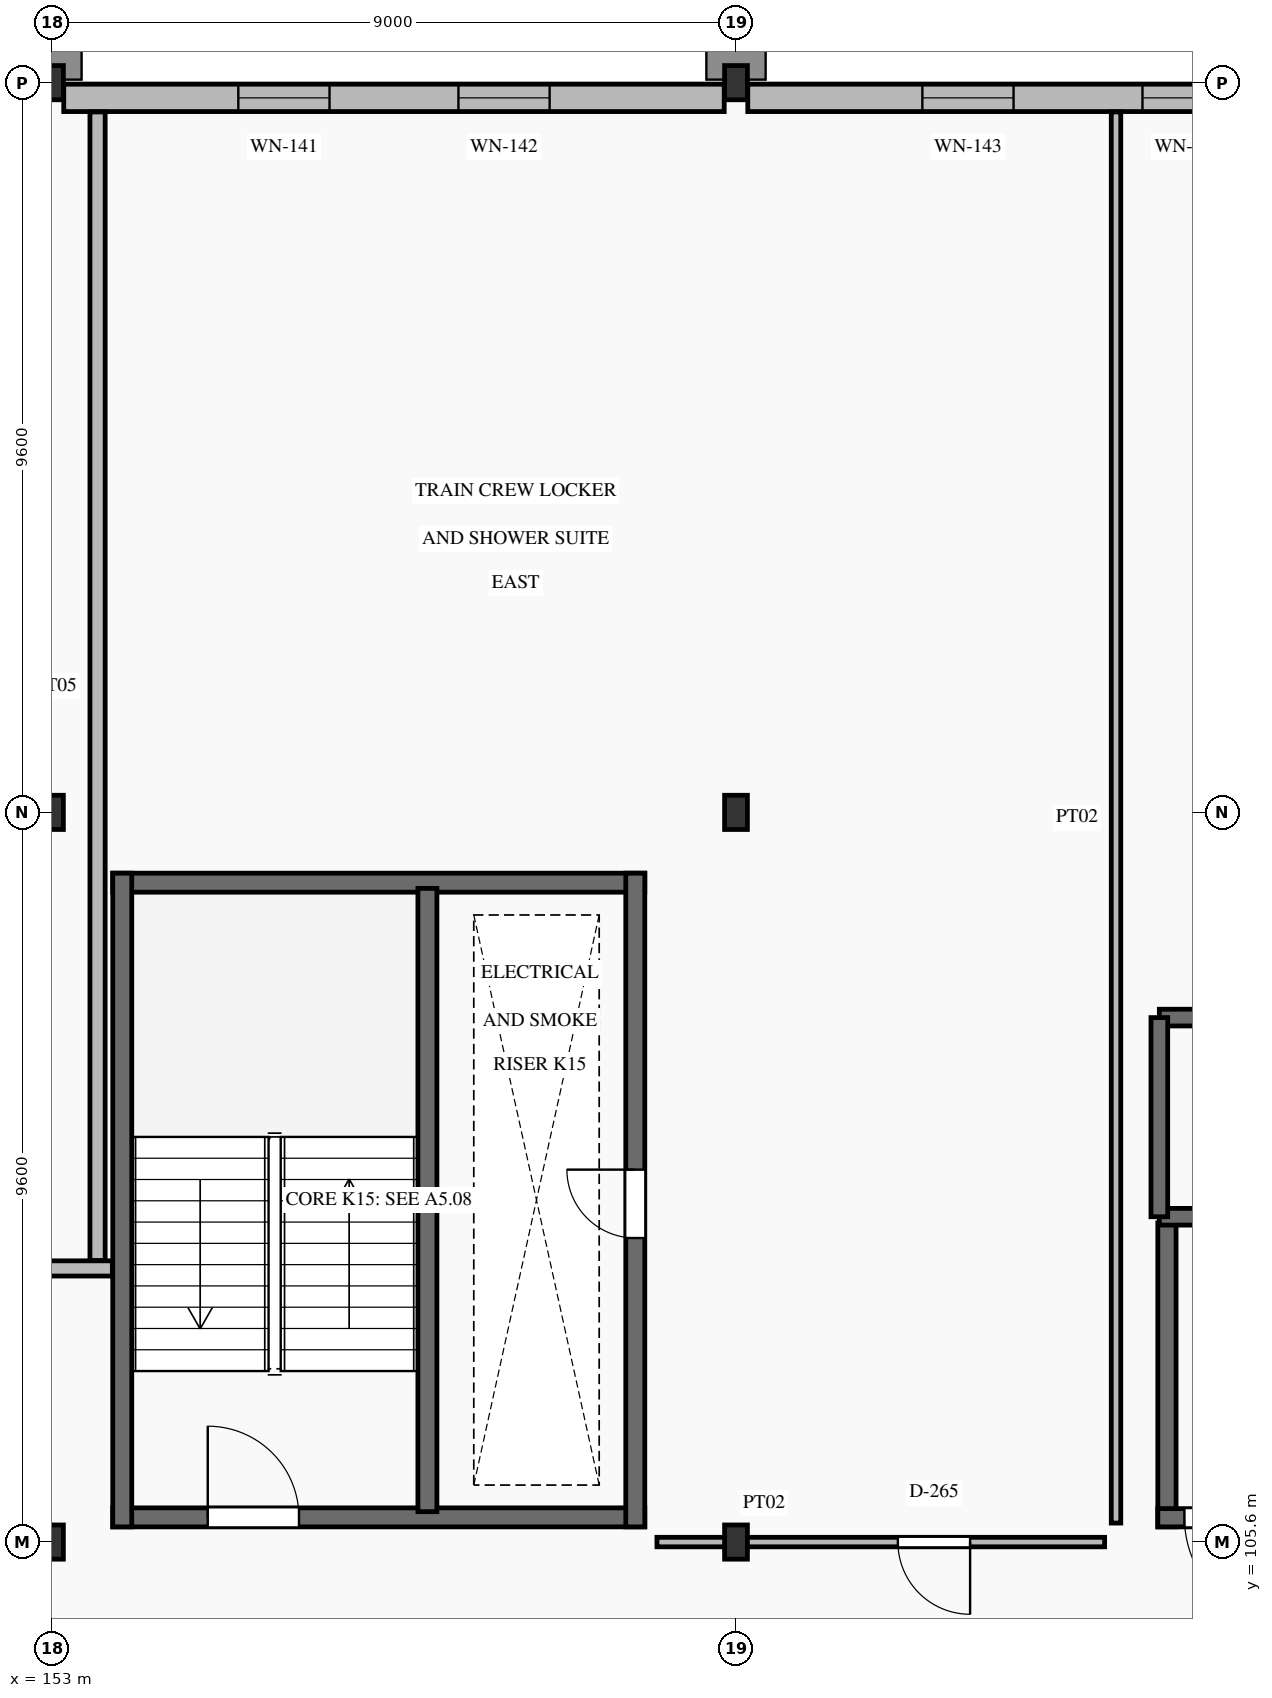
"""IFC4 building model, lengths in metres.
Left out: names, types, materials, properties, quantities, classifications, styles, units other than length and angle.
Written with IfcOpenShell. Run it as: python <this file> out.ifc"""

import sys

from ifc_helpers import new_model, si_unit, direction, frame, frame_2d, origin, origin_2d, place, context, subcontext, project, spatial, rectangle, i_section, extrude, element, fill, save


model = new_model("IFC4")
c1 = context("Model", 3, precision=1e-05, world=origin(), true_north=direction((0.0, 1.0)))
c2 = subcontext(c1, "Body", "Model", "MODEL_VIEW")
j1 = project(units=[si_unit("LENGTHUNIT", "METRE"), si_unit("PLANEANGLEUNIT", "RADIAN")], contexts=[c1])
p1 = place(None, origin())
s1 = spatial("IfcSite", under=j1, at=p1, CompositionType="ELEMENT")
p2 = place(p1, origin())
s2 = spatial("IfcBuilding", under=s1, at=p2, CompositionType="ELEMENT")
p3 = place(p2, frame((0.0, 0.0, 10.8)))
s3 = spatial("IfcBuildingStorey", under=s2, at=p3, CompositionType="ELEMENT", Elevation=10.8)
for number, where, z_axis, x_axis in (
    (1, (153.0, 105.6, 0.0), (0.0, 0.0, 1.0), (1.0, 0.0, 0.0)),
    (2, (153.0, 115.2, 0.0), (0.0, 0.0, 1.0), (1.0, 0.0, 0.0)),
    (3, (153.0, 124.8, 0.0), (0.0, 0.0, 1.0), (1.0, 0.0, 0.0)),
    (4, (162.0, 105.6, 0.0), (0.0, 0.0, 1.0), (1.0, 0.0, 0.0)),
    (5, (162.0, 115.2, 0.0), (0.0, 0.0, 1.0), (1.0, 0.0, 0.0)),
    (6, (162.0, 124.8, 0.0), (0.0, 0.0, 1.0), (1.0, 0.0, 0.0)),
):
    element("IfcColumn", number, at=place(p3, frame(where, z_axis=z_axis, x_axis=x_axis)), inside=s3, PredefinedType="COLUMN", context=c2, shape_type="SweptSolid", body=[
        extrude(i_section(OverallWidth=0.3, OverallDepth=0.45, WebThickness=0.014, FlangeThickness=0.026, FilletRadius=0.027, at=origin_2d()), origin(), (0.0, 0.0, 1.0), 4.2),
    ])
p4 = place(p3, frame((153.155, 124.6, 0.0), z_axis=(0.0, 0.0, 1.0), x_axis=(1.0, 0.0, 0.0)))
e7 = element("IfcWall", 7, at=p4, inside=s3, PredefinedType="SOLIDWALL", context=c2, shape_type="SweptSolid", body=[
    extrude(rectangle(XDim=8.69, YDim=0.36, at=frame_2d((4.345, 0.0))), origin(), (0.0, 0.0, 1.0), 3.69),
])
p5 = place(p4, frame((2.297, 0.0, 0.95)))
e8 = element("IfcOpeningElement", 8, at=p5, cuts=e7, PredefinedType="OPENING", context=c2, shape_type="SweptSolid", body=[
    extrude(rectangle(XDim=1.2, YDim=1.8, at=frame_2d((0.6, 0.9))), frame((0.0, 0.195, 0.0), z_axis=(0.0, -1.0, 0.0), x_axis=(1.0, 0.0, 0.0)), (0.0, 0.0, 1.0), 0.39),
])
p6 = place(p4, frame((5.193, 0.0, 0.95)))
e9 = element("IfcOpeningElement", 9, at=p6, cuts=e7, PredefinedType="OPENING", context=c2, shape_type="SweptSolid", body=[
    extrude(rectangle(XDim=1.2, YDim=1.8, at=frame_2d((0.6, 0.9))), frame((0.0, 0.195, 0.0), z_axis=(0.0, -1.0, 0.0), x_axis=(1.0, 0.0, 0.0)), (0.0, 0.0, 1.0), 0.39),
])
p7 = place(p3, frame((162.155, 124.6, 0.0), z_axis=(0.0, 0.0, 1.0), x_axis=(1.0, 0.0, 0.0)))
e10 = element("IfcWall", 10, at=p7, inside=s3, PredefinedType="SOLIDWALL", context=c2, shape_type="SweptSolid", body=[
    extrude(rectangle(XDim=8.69, YDim=0.36, at=frame_2d((4.345, 0.0))), origin(), (0.0, 0.0, 1.0), 3.69),
])
p8 = place(p7, frame((2.297, 0.0, 0.95)))
e11 = element("IfcOpeningElement", 11, at=p8, cuts=e10, PredefinedType="OPENING", context=c2, shape_type="SweptSolid", body=[
    extrude(rectangle(XDim=1.2, YDim=1.8, at=frame_2d((0.6, 0.9))), frame((0.0, 0.195, 0.0), z_axis=(0.0, -1.0, 0.0), x_axis=(1.0, 0.0, 0.0)), (0.0, 0.0, 1.0), 0.39),
])
p9 = place(p7, frame((5.193, 0.0, 0.95)))
e12 = element("IfcOpeningElement", 12, at=p9, cuts=e10, PredefinedType="OPENING", context=c2, shape_type="SweptSolid", body=[
    extrude(rectangle(XDim=1.2, YDim=1.8, at=frame_2d((0.6, 0.9))), frame((0.0, 0.195, 0.0), z_axis=(0.0, -1.0, 0.0), x_axis=(1.0, 0.0, 0.0)), (0.0, 0.0, 1.0), 0.39),
])
p10 = place(p3, frame((167.67, 105.8, 0.0), z_axis=(0.0, 0.0, 1.0), x_axis=(0.0, 1.0, 0.0)))
e13 = element("IfcWall", 13, at=p10, inside=s3, PredefinedType="SHEAR", context=c2, shape_type="SweptSolid", body=[
    extrude(rectangle(XDim=4.0, YDim=0.24, at=frame_2d((2.0, 0.0))), origin(), (0.0, 0.0, 1.0), 4.2),
])
p11 = place(p3, frame((167.55, 105.92, 0.0), z_axis=(0.0, 0.0, 1.0), x_axis=(1.0, 0.0, 0.0)))
e14 = element("IfcWall", 14, at=p11, inside=s3, PredefinedType="SHEAR", context=c2, shape_type="SweptSolid", body=[
    extrude(rectangle(XDim=4.2, YDim=0.24, at=frame_2d((2.1, 0.0))), origin(), (0.0, 0.0, 1.0), 4.2),
])
p12 = place(p11, frame((0.35, 0.0, 0.0)))
e15 = element("IfcOpeningElement", 15, at=p12, cuts=e14, PredefinedType="OPENING", context=c2, shape_type="SweptSolid", body=[
    extrude(rectangle(XDim=1.4, YDim=2.2, at=frame_2d((0.7, 1.1))), frame((0.0, 0.135, 0.0), z_axis=(0.0, -1.0, 0.0), x_axis=(1.0, 0.0, 0.0)), (0.0, 0.0, 1.0), 0.27),
])
p13 = place(p3, frame((153.8, 105.925, 0.0), z_axis=(0.0, 0.0, 1.0), x_axis=(1.0, 0.0, 0.0)))
e16 = element("IfcWall", 16, at=p13, inside=s3, PredefinedType="SHEAR", context=c2, shape_type="SweptSolid", body=[
    extrude(rectangle(XDim=7.0, YDim=0.25, at=frame_2d((3.5, 0.0))), origin(), (0.0, 0.0, 1.0), 4.2),
])
p14 = place(p13, frame((1.25, 0.0, 0.0)))
e17 = element("IfcOpeningElement", 17, at=p14, cuts=e16, PredefinedType="OPENING", context=c2, shape_type="SweptSolid", body=[
    extrude(rectangle(XDim=1.2, YDim=2.15, at=frame_2d((0.6, 1.075))), frame((0.0, 0.14, 0.0), z_axis=(0.0, -1.0, 0.0), x_axis=(1.0, 0.0, 0.0)), (0.0, 0.0, 1.0), 0.28),
])
p15 = place(p3, frame((153.8, 114.275, 0.0), z_axis=(0.0, 0.0, 1.0), x_axis=(1.0, 0.0, 0.0)))
e18 = element("IfcWall", 18, at=p15, inside=s3, PredefinedType="SHEAR", context=c2, shape_type="SweptSolid", body=[
    extrude(rectangle(XDim=7.0, YDim=0.25, at=frame_2d((3.5, 0.0))), origin(), (0.0, 0.0, 1.0), 4.2),
])
p16 = place(p3, frame((153.925, 105.8, 0.0), z_axis=(0.0, 0.0, 1.0), x_axis=(0.0, 1.0, 0.0)))
e19 = element("IfcWall", 19, at=p16, inside=s3, PredefinedType="SHEAR", context=c2, shape_type="SweptSolid", body=[
    extrude(rectangle(XDim=8.6, YDim=0.25, at=frame_2d((4.3, 0.0))), origin(), (0.0, 0.0, 1.0), 4.2),
])
p17 = place(p3, frame((160.675, 105.8, 0.0), z_axis=(0.0, 0.0, 1.0), x_axis=(0.0, 1.0, 0.0)))
e20 = element("IfcWall", 20, at=p17, inside=s3, PredefinedType="SHEAR", context=c2, shape_type="SweptSolid", body=[
    extrude(rectangle(XDim=8.6, YDim=0.25, at=frame_2d((4.3, 0.0))), origin(), (0.0, 0.0, 1.0), 4.2),
])
p18 = place(p17, frame((3.8, 0.0, 0.0)))
e21 = element("IfcOpeningElement", 21, at=p18, cuts=e20, PredefinedType="OPENING", context=c2, shape_type="SweptSolid", body=[
    extrude(rectangle(XDim=0.9, YDim=2.05, at=frame_2d((0.45, 1.025))), frame((0.0, 0.14, 0.0), z_axis=(0.0, -1.0, 0.0), x_axis=(1.0, 0.0, 0.0)), (0.0, 0.0, 1.0), 0.28),
])
p19 = place(p3, frame((157.94, 106.0, 0.0), z_axis=(0.0, 0.0, 1.0), x_axis=(0.0, 1.0, 0.0)))
e22 = element("IfcWall", 22, at=p19, inside=s3, PredefinedType="SHEAR", context=c2, shape_type="SweptSolid", body=[
    extrude(rectangle(XDim=8.2, YDim=0.25, at=frame_2d((4.1, 0.0))), origin(), (0.0, 0.0, 1.0), 4.2),
])
p20 = place(p3, frame((167.57, 109.88, 0.0), z_axis=(0.0, 0.0, 1.0), x_axis=(1.0, 0.0, 0.0)))
e23 = element("IfcWall", 23, at=p20, inside=s3, PredefinedType="SHEAR", context=c2, shape_type="SweptSolid", body=[
    extrude(rectangle(XDim=4.16, YDim=0.22, at=frame_2d((2.08, 0.0))), origin(), (0.0, 0.0, 1.0), 4.2),
])
p21 = place(p20, frame((1.53, 0.0, 0.0)))
e24 = element("IfcOpeningElement", 24, at=p21, cuts=e23, PredefinedType="OPENING", context=c2, shape_type="SweptSolid", body=[
    extrude(rectangle(XDim=1.1, YDim=2.15, at=frame_2d((0.55, 1.075))), frame((0.0, 0.125, 0.0), z_axis=(0.0, -1.0, 0.0), x_axis=(1.0, 0.0, 0.0)), (0.0, 0.0, 1.0), 0.25),
])
p22 = place(p3, frame((167.57, 112.5, 0.0), z_axis=(0.0, 0.0, 1.0), x_axis=(1.0, 0.0, 0.0)))
e25 = element("IfcWall", 25, at=p22, inside=s3, PredefinedType="SHEAR", context=c2, shape_type="SweptSolid", body=[
    extrude(rectangle(XDim=4.16, YDim=0.22, at=frame_2d((2.08, 0.0))), origin(), (0.0, 0.0, 1.0), 4.2),
])
p23 = place(p3, frame((167.57, 109.88, 0.0), z_axis=(0.0, 0.0, 1.0), x_axis=(0.0, 1.0, 0.0)))
e26 = element("IfcWall", 26, at=p23, inside=s3, PredefinedType="SHEAR", context=c2, shape_type="SweptSolid", body=[
    extrude(rectangle(XDim=2.62, YDim=0.22, at=frame_2d((1.31, 0.0))), origin(), (0.0, 0.0, 1.0), 4.2),
])
p24 = place(p3, frame((138.255, 109.2, 0.0), z_axis=(0.0, 0.0, 1.0), x_axis=(1.0, 0.0, 0.0)))
e27 = element("IfcWall", 27, at=p24, inside=s3, PredefinedType="PARTITIONING", context=c2, shape_type="SweptSolid", body=[
    extrude(rectangle(XDim=15.54, YDim=0.2, at=frame_2d((7.77, 0.0))), origin(), (0.0, 0.0, 1.0), 3.94),
])
p25 = place(p24, frame((7.57, 0.0, 0.0)))
e28 = element("IfcOpeningElement", 28, at=p25, cuts=e27, PredefinedType="OPENING", context=c2, shape_type="SweptSolid", body=[
    extrude(rectangle(XDim=0.95, YDim=2.1, at=frame_2d((0.475, 1.05))), frame((0.0, 0.115, 0.0), z_axis=(0.0, -1.0, 0.0), x_axis=(1.0, 0.0, 0.0)), (0.0, 0.0, 1.0), 0.23),
])
p26 = place(p3, frame((160.96, 105.6, 0.0), z_axis=(0.0, 0.0, 1.0), x_axis=(1.0, 0.0, 0.0)))
e29 = element("IfcWall", 29, at=p26, inside=s3, PredefinedType="PARTITIONING", context=c2, shape_type="SweptSolid", body=[
    extrude(rectangle(XDim=5.89, YDim=0.125, at=frame_2d((2.945, 0.0))), origin(), (0.0, 0.0, 1.0), 3.5),
])
p27 = place(p26, frame((3.17, 0.0, 0.0)))
e30 = element("IfcOpeningElement", 30, at=p27, cuts=e29, PredefinedType="OPENING", context=c2, shape_type="SweptSolid", body=[
    extrude(rectangle(XDim=0.95, YDim=2.1, at=frame_2d((0.475, 1.05))), frame((0.0, 0.077, 0.0), z_axis=(0.0, -1.0, 0.0), x_axis=(1.0, 0.0, 0.0)), (0.0, 0.0, 1.0), 0.155),
])
p28 = place(p3, frame((153.6, 109.305, 0.0), z_axis=(0.0, 0.0, 1.0), x_axis=(0.0, 1.0, 0.0)))
e31 = element("IfcWall", 31, at=p28, inside=s3, PredefinedType="PARTITIONING", context=c2, shape_type="SweptSolid", body=[
    extrude(rectangle(XDim=15.11, YDim=0.2, at=frame_2d((7.555, 0.0))), origin(), (0.0, 0.0, 1.0), 3.94),
])
p29 = place(p3, frame((167.0, 105.85, 0.0), z_axis=(0.0, 0.0, 1.0), x_axis=(0.0, 1.0, 0.0)))
e32 = element("IfcWall", 32, at=p29, inside=s3, PredefinedType="PARTITIONING", context=c2, shape_type="SweptSolid", body=[
    extrude(rectangle(XDim=18.565, YDim=0.125, at=frame_2d((9.282, 0.0))), origin(), (0.0, 0.0, 1.0), 3.94),
])
p30 = place(p5, origin())
e33 = element("IfcWindow", 33, at=p30, inside=s3, PartitioningType="SINGLE_PANEL", PredefinedType="WINDOW", context=c2, shape_type="SweptSolid", body=[
    extrude(rectangle(XDim=1.2, YDim=1.8, at=frame_2d((0.6, 0.9))), frame((0.0, 0.03, 0.0), z_axis=(0.0, -1.0, 0.0), x_axis=(1.0, 0.0, 0.0)), (0.0, 0.0, 1.0), 0.06),
])
fill(e8, e33)
p31 = place(p6, origin())
e34 = element("IfcWindow", 34, at=p31, inside=s3, PartitioningType="SINGLE_PANEL", PredefinedType="WINDOW", context=c2, shape_type="SweptSolid", body=[
    extrude(rectangle(XDim=1.2, YDim=1.8, at=frame_2d((0.6, 0.9))), frame((0.0, 0.03, 0.0), z_axis=(0.0, -1.0, 0.0), x_axis=(1.0, 0.0, 0.0)), (0.0, 0.0, 1.0), 0.06),
])
fill(e9, e34)
p32 = place(p8, origin())
e35 = element("IfcWindow", 35, at=p32, inside=s3, PartitioningType="SINGLE_PANEL", PredefinedType="WINDOW", context=c2, shape_type="SweptSolid", body=[
    extrude(rectangle(XDim=1.2, YDim=1.8, at=frame_2d((0.6, 0.9))), frame((0.0, 0.03, 0.0), z_axis=(0.0, -1.0, 0.0), x_axis=(1.0, 0.0, 0.0)), (0.0, 0.0, 1.0), 0.06),
])
fill(e11, e35)
p33 = place(p9, origin())
e36 = element("IfcWindow", 36, at=p33, inside=s3, PartitioningType="SINGLE_PANEL", PredefinedType="WINDOW", context=c2, shape_type="SweptSolid", body=[
    extrude(rectangle(XDim=1.2, YDim=1.8, at=frame_2d((0.6, 0.9))), frame((0.0, 0.03, 0.0), z_axis=(0.0, -1.0, 0.0), x_axis=(1.0, 0.0, 0.0)), (0.0, 0.0, 1.0), 0.06),
])
fill(e12, e36)
p34 = place(p12, frame((1.4, 0.0, 0.0), z_axis=(0.0, 0.0, 1.0), x_axis=(-1.0, 0.0, 0.0)))
e37 = element("IfcDoor", 37, at=p34, inside=s3, OperationType="SINGLE_SWING_RIGHT", PredefinedType="DOOR", context=c2, shape_type="SweptSolid", body=[
    extrude(rectangle(XDim=1.4, YDim=2.2, at=frame_2d((0.7, 1.1))), frame((0.0, 0.025, 0.0), z_axis=(0.0, -1.0, 0.0), x_axis=(1.0, 0.0, 0.0)), (0.0, 0.0, 1.0), 0.05),
])
fill(e15, e37)
p35 = place(p14, origin())
e38 = element("IfcDoor", 38, at=p35, inside=s3, OperationType="SINGLE_SWING_LEFT", PredefinedType="DOOR", context=c2, shape_type="SweptSolid", body=[
    extrude(rectangle(XDim=1.2, YDim=2.15, at=frame_2d((0.6, 1.075))), frame((0.0, 0.025, 0.0), z_axis=(0.0, -1.0, 0.0), x_axis=(1.0, 0.0, 0.0)), (0.0, 0.0, 1.0), 0.05),
])
fill(e17, e38)
p36 = place(p18, origin())
e39 = element("IfcDoor", 39, at=p36, inside=s3, OperationType="SINGLE_SWING_RIGHT", PredefinedType="DOOR", context=c2, shape_type="SweptSolid", body=[
    extrude(rectangle(XDim=0.9, YDim=2.05, at=frame_2d((0.45, 1.025))), frame((0.0, 0.025, 0.0), z_axis=(0.0, -1.0, 0.0), x_axis=(1.0, 0.0, 0.0)), (0.0, 0.0, 1.0), 0.05),
])
fill(e21, e39)
p37 = place(p27, frame((0.95, 0.0, 0.0), z_axis=(0.0, 0.0, 1.0), x_axis=(-1.0, 0.0, 0.0)))
e40 = element("IfcDoor", 40, at=p37, inside=s3, OperationType="SINGLE_SWING_RIGHT", PredefinedType="DOOR", context=c2, shape_type="SweptSolid", body=[
    extrude(rectangle(XDim=0.95, YDim=2.1, at=frame_2d((0.475, 1.05))), frame((0.0, 0.025, 0.0), z_axis=(0.0, -1.0, 0.0), x_axis=(1.0, 0.0, 0.0)), (0.0, 0.0, 1.0), 0.05),
])
fill(e30, e40)
save(model, sys.argv[1])
